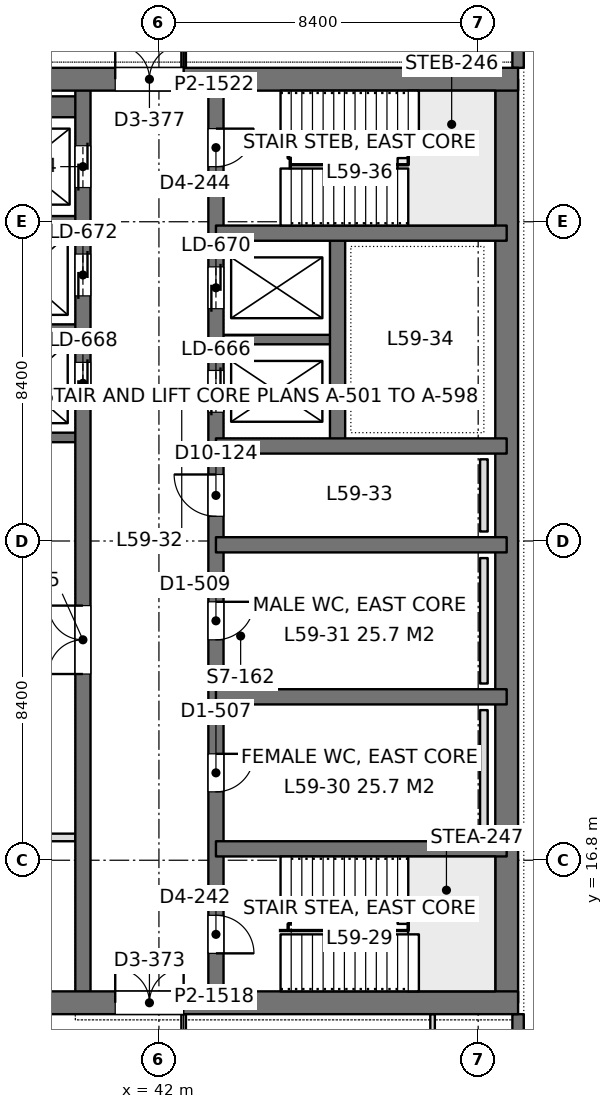
"""IFC4 building model, lengths in metres.
Left out: names, types, materials, properties, quantities, classifications, styles, units other than length and angle.
Written with IfcOpenShell. Run it as: python <this file> out.ifc"""

import sys

from ifc_helpers import new_model, si_unit, direction, frame, frame_2d, origin, place, context, subcontext, project, spatial, rectangle, extrude, element, fill, save


model = new_model("IFC4")
c1 = context("Model", 3, precision=1e-05, world=origin(), true_north=direction((0.0, 1.0)))
c2 = subcontext(c1, "Body", "Model", "MODEL_VIEW")
j1 = project(units=[si_unit("LENGTHUNIT", "METRE"), si_unit("PLANEANGLEUNIT", "RADIAN")], contexts=[c1])
p1 = place(None, origin())
s1 = spatial("IfcSite", under=j1, at=p1, CompositionType="ELEMENT")
p2 = place(p1, origin())
s2 = spatial("IfcBuilding", under=s1, at=p2, CompositionType="ELEMENT")
p3 = place(p2, frame((0.0, 0.0, 259.2)))
s3 = spatial("IfcBuildingStorey", under=s2, at=p3, CompositionType="ELEMENT", Elevation=259.2)
p4 = place(p3, frame((33.75, 13.05, 0.0), z_axis=(0.0, 0.0, 1.0), x_axis=(1.0, 0.0, 0.0)))
e1 = element("IfcWall", 1, at=p4, inside=s3, PredefinedType="SHEAR", context=c2, shape_type="SweptSolid", body=[
    extrude(rectangle(XDim=17.7, YDim=0.6, at=frame_2d((8.85, 0.0))), origin(), (0.0, 0.0, 1.0), 4.5),
])
p5 = place(p4, frame((7.1, 0.0, 0.0)))
e2 = element("IfcOpeningElement", 2, at=p5, cuts=e1, PredefinedType="OPENING", context=c2, shape_type="SweptSolid", body=[
    extrude(rectangle(XDim=1.8, YDim=2.4, at=frame_2d((0.9, 1.2))), frame((0.0, 0.31, 0.0), z_axis=(0.0, -1.0, 0.0), x_axis=(1.0, 0.0, 0.0)), (0.0, 0.0, 1.0), 0.62),
])
p6 = place(p3, frame((33.75, 37.35, 0.0), z_axis=(0.0, 0.0, 1.0), x_axis=(1.0, 0.0, 0.0)))
e3 = element("IfcWall", 3, at=p6, inside=s3, PredefinedType="SHEAR", context=c2, shape_type="SweptSolid", body=[
    extrude(rectangle(XDim=17.7, YDim=0.6, at=frame_2d((8.85, 0.0))), origin(), (0.0, 0.0, 1.0), 4.5),
])
p7 = place(p6, frame((7.1, 0.0, 0.0)))
e4 = element("IfcOpeningElement", 4, at=p7, cuts=e3, PredefinedType="OPENING", context=c2, shape_type="SweptSolid", body=[
    extrude(rectangle(XDim=1.8, YDim=2.4, at=frame_2d((0.9, 1.2))), frame((0.0, 0.31, 0.0), z_axis=(0.0, -1.0, 0.0), x_axis=(1.0, 0.0, 0.0)), (0.0, 0.0, 1.0), 0.62),
])
p8 = place(p3, frame((51.15, 13.05, 0.0), z_axis=(0.0, 0.0, 1.0), x_axis=(0.0, 1.0, 0.0)))
e5 = element("IfcWall", 5, at=p8, inside=s3, PredefinedType="SHEAR", context=c2, shape_type="SweptSolid", body=[
    extrude(rectangle(XDim=24.3, YDim=0.6, at=frame_2d((12.15, 0.0))), origin(), (0.0, 0.0, 1.0), 4.5),
])
p9 = place(p3, frame((43.5, 13.05, 0.0), z_axis=(0.0, 0.0, 1.0), x_axis=(0.0, 1.0, 0.0)))
e6 = element("IfcWall", 6, at=p9, inside=s3, PredefinedType="SHEAR", context=c2, shape_type="SweptSolid", body=[
    extrude(rectangle(XDim=24.3, YDim=0.4, at=frame_2d((12.15, 0.0))), origin(), (0.0, 0.0, 1.0), 4.5),
])
p10 = place(p9, frame((1.3, 0.0, 0.0)))
e7 = element("IfcOpeningElement", 7, at=p10, cuts=e6, PredefinedType="OPENING", context=c2, shape_type="SweptSolid", body=[
    extrude(rectangle(XDim=1.0, YDim=2.2, at=frame_2d((0.5, 1.1))), frame((0.0, 0.21, 0.0), z_axis=(0.0, -1.0, 0.0), x_axis=(1.0, 0.0, 0.0)), (0.0, 0.0, 1.0), 0.42),
])
p11 = place(p9, frame((22.0, 0.0, 0.0)))
e8 = element("IfcOpeningElement", 8, at=p11, cuts=e6, PredefinedType="OPENING", context=c2, shape_type="SweptSolid", body=[
    extrude(rectangle(XDim=1.0, YDim=2.2, at=frame_2d((0.5, 1.1))), frame((0.0, 0.21, 0.0), z_axis=(0.0, -1.0, 0.0), x_axis=(1.0, 0.0, 0.0)), (0.0, 0.0, 1.0), 0.42),
])
p12 = place(p9, frame((5.55, 0.0, 0.0)))
e9 = element("IfcOpeningElement", 9, at=p12, cuts=e6, PredefinedType="OPENING", context=c2, shape_type="SweptSolid", body=[
    extrude(rectangle(XDim=1.0, YDim=2.2, at=frame_2d((0.5, 1.1))), frame((0.0, 0.21, 0.0), z_axis=(0.0, -1.0, 0.0), x_axis=(1.0, 0.0, 0.0)), (0.0, 0.0, 1.0), 0.42),
])
p13 = place(p9, frame((9.55, 0.0, 0.0)))
e10 = element("IfcOpeningElement", 10, at=p13, cuts=e6, PredefinedType="OPENING", context=c2, shape_type="SweptSolid", body=[
    extrude(rectangle(XDim=1.0, YDim=2.2, at=frame_2d((0.5, 1.1))), frame((0.0, 0.21, 0.0), z_axis=(0.0, -1.0, 0.0), x_axis=(1.0, 0.0, 0.0)), (0.0, 0.0, 1.0), 0.42),
])
p14 = place(p9, frame((12.8, 0.0, 0.0)))
e11 = element("IfcOpeningElement", 11, at=p14, cuts=e6, PredefinedType="OPENING", context=c2, shape_type="SweptSolid", body=[
    extrude(rectangle(XDim=1.1, YDim=2.2, at=frame_2d((0.55, 1.1))), frame((0.0, 0.21, 0.0), z_axis=(0.0, -1.0, 0.0), x_axis=(1.0, 0.0, 0.0)), (0.0, 0.0, 1.0), 0.42),
])
p15 = place(p9, frame((15.538, 0.0, 0.0)))
e12 = element("IfcOpeningElement", 12, at=p15, cuts=e6, PredefinedType="OPENING", context=c2, shape_type="SweptSolid", body=[
    extrude(rectangle(XDim=1.1, YDim=2.2, at=frame_2d((0.55, 1.1))), frame((0.0, 0.21, 0.0), z_axis=(0.0, -1.0, 0.0), x_axis=(1.0, 0.0, 0.0)), (0.0, 0.0, 1.0), 0.42),
])
p16 = place(p9, frame((18.262, 0.0, 0.0)))
e13 = element("IfcOpeningElement", 13, at=p16, cuts=e6, PredefinedType="OPENING", context=c2, shape_type="SweptSolid", body=[
    extrude(rectangle(XDim=1.1, YDim=2.2, at=frame_2d((0.55, 1.1))), frame((0.0, 0.21, 0.0), z_axis=(0.0, -1.0, 0.0), x_axis=(1.0, 0.0, 0.0)), (0.0, 0.0, 1.0), 0.42),
])
p17 = place(p3, frame((40.0, 13.05, 0.0), z_axis=(0.0, 0.0, 1.0), x_axis=(0.0, 1.0, 0.0)))
e14 = element("IfcWall", 14, at=p17, inside=s3, PredefinedType="SHEAR", context=c2, shape_type="SweptSolid", body=[
    extrude(rectangle(XDim=24.3, YDim=0.4, at=frame_2d((12.15, 0.0))), origin(), (0.0, 0.0, 1.0), 4.5),
])
p18 = place(p17, frame((15.75, 0.0, 0.0)))
e15 = element("IfcOpeningElement", 15, at=p18, cuts=e14, PredefinedType="OPENING", context=c2, shape_type="SweptSolid", body=[
    extrude(rectangle(XDim=1.1, YDim=2.2, at=frame_2d((0.55, 1.1))), frame((0.0, 0.21, 0.0), z_axis=(0.0, -1.0, 0.0), x_axis=(1.0, 0.0, 0.0)), (0.0, 0.0, 1.0), 0.42),
])
p19 = place(p17, frame((18.6, 0.0, 0.0)))
e16 = element("IfcOpeningElement", 16, at=p19, cuts=e14, PredefinedType="OPENING", context=c2, shape_type="SweptSolid", body=[
    extrude(rectangle(XDim=1.1, YDim=2.2, at=frame_2d((0.55, 1.1))), frame((0.0, 0.21, 0.0), z_axis=(0.0, -1.0, 0.0), x_axis=(1.0, 0.0, 0.0)), (0.0, 0.0, 1.0), 0.42),
])
p20 = place(p17, frame((21.45, 0.0, 0.0)))
e17 = element("IfcOpeningElement", 17, at=p20, cuts=e14, PredefinedType="OPENING", context=c2, shape_type="SweptSolid", body=[
    extrude(rectangle(XDim=1.1, YDim=2.2, at=frame_2d((0.55, 1.1))), frame((0.0, 0.21, 0.0), z_axis=(0.0, -1.0, 0.0), x_axis=(1.0, 0.0, 0.0)), (0.0, 0.0, 1.0), 0.42),
])
p21 = place(p17, frame((8.65, 0.0, 0.0)))
e18 = element("IfcOpeningElement", 18, at=p21, cuts=e14, PredefinedType="OPENING", context=c2, shape_type="SweptSolid", body=[
    extrude(rectangle(XDim=1.8, YDim=2.4, at=frame_2d((0.9, 1.2))), frame((0.0, 0.21, 0.0), z_axis=(0.0, -1.0, 0.0), x_axis=(1.0, 0.0, 0.0)), (0.0, 0.0, 1.0), 0.42),
])
for number, where, z_axis, x_axis in (
    (19, (51.15, 17.1, 0.0), (0.0, 0.0, 1.0), (-1.0, 0.0, 0.0)),
    (20, (51.15, 21.1, 0.0), (0.0, 0.0, 1.0), (-1.0, 0.0, 0.0)),
    (21, (51.15, 25.1, 0.0), (0.0, 0.0, 1.0), (-1.0, 0.0, 0.0)),
    (22, (51.15, 27.7, 0.0), (0.0, 0.0, 1.0), (-1.0, 0.0, 0.0)),
    (23, (51.15, 33.3, 0.0), (0.0, 0.0, 1.0), (-1.0, 0.0, 0.0)),
):
    element("IfcWall", number, at=place(p3, frame(where, z_axis=z_axis, x_axis=x_axis)), inside=s3, PredefinedType="SHEAR", context=c2, shape_type="SweptSolid", body=[
        extrude(rectangle(XDim=7.65, YDim=0.4, at=frame_2d((3.825, 0.0))), origin(), (0.0, 0.0, 1.0), 4.5),
    ])
p22 = place(p3, frame((46.7, 27.7, 0.0), z_axis=(0.0, 0.0, 1.0), x_axis=(0.0, 1.0, 0.0)))
e24 = element("IfcWall", 24, at=p22, inside=s3, PredefinedType="SHEAR", context=c2, shape_type="SweptSolid", body=[
    extrude(rectangle(XDim=5.6, YDim=0.4, at=frame_2d((2.8, 0.0))), origin(), (0.0, 0.0, 1.0), 4.5),
])
p23 = place(p3, frame((46.7, 30.5, 0.0), z_axis=(0.0, 0.0, 1.0), x_axis=(-1.0, 0.0, 0.0)))
e25 = element("IfcWall", 25, at=p23, inside=s3, PredefinedType="SHEAR", context=c2, shape_type="SweptSolid", body=[
    extrude(rectangle(XDim=3.2, YDim=0.25, at=frame_2d((1.6, 0.0))), origin(), (0.0, 0.0, 1.0), 4.5),
])
p24 = place(p3, frame((40.0, 27.925, 0.0), z_axis=(0.0, 0.0, 1.0), x_axis=(-1.0, 0.0, 0.0)))
e26 = element("IfcWall", 26, at=p24, inside=s3, PredefinedType="SHEAR", context=c2, shape_type="SweptSolid", body=[
    extrude(rectangle(XDim=5.95, YDim=0.25, at=frame_2d((2.975, 0.0))), origin(), (0.0, 0.0, 1.0), 4.5),
])
for number, where, z_axis, x_axis in (
    (27, (40.0, 30.775, 0.0), (0.0, 0.0, 1.0), (-1.0, 0.0, 0.0)),
    (28, (40.0, 33.625, 0.0), (0.0, 0.0, 1.0), (-1.0, 0.0, 0.0)),
):
    element("IfcWall", number, at=place(p3, frame(where, z_axis=z_axis, x_axis=x_axis)), inside=s3, PredefinedType="SHEAR", context=c2, shape_type="SweptSolid", body=[
        extrude(rectangle(XDim=3.2, YDim=0.25, at=frame_2d((1.6, 0.0))), origin(), (0.0, 0.0, 1.0), 4.5),
    ])
p25 = place(p3, frame((40.0, 36.625, 0.0), z_axis=(0.0, 0.0, 1.0), x_axis=(-1.0, 0.0, 0.0)))
e29 = element("IfcWall", 29, at=p25, inside=s3, PredefinedType="SHEAR", context=c2, shape_type="SweptSolid", body=[
    extrude(rectangle(XDim=3.2, YDim=0.55, at=frame_2d((1.6, 0.0))), origin(), (0.0, 0.0, 1.0), 4.5),
])
p26 = place(p3, frame((51.45, 42.0, 0.0), z_axis=(0.0, 0.0, 1.0), x_axis=(0.0, -1.0, 0.0)))
e30 = element("IfcWall", 30, at=p26, inside=s3, PredefinedType="SOLIDWALL", context=c2, shape_type="SweptSolid", body=[
    extrude(rectangle(XDim=4.35, YDim=0.3, at=frame_2d((2.175, 0.0))), origin(), (0.0, 0.0, 1.0), 4.35),
])
p27 = place(p26, frame((0.975, 0.0, 0.9)))
e31 = element("IfcOpeningElement", 31, at=p27, cuts=e30, PredefinedType="OPENING", context=c2, shape_type="SweptSolid", body=[
    extrude(rectangle(XDim=2.4, YDim=1.9, at=frame_2d((1.2, 0.95))), frame((0.0, 0.16, 0.0), z_axis=(0.0, -1.0, 0.0), x_axis=(1.0, 0.0, 0.0)), (0.0, 0.0, 1.0), 0.32),
])
p28 = place(p3, frame((51.45, 12.75, 0.0), z_axis=(0.0, 0.0, 1.0), x_axis=(0.0, -1.0, 0.0)))
e32 = element("IfcWall", 32, at=p28, inside=s3, PredefinedType="SOLIDWALL", context=c2, shape_type="SweptSolid", body=[
    extrude(rectangle(XDim=4.35, YDim=0.3, at=frame_2d((2.175, 0.0))), origin(), (0.0, 0.0, 1.0), 4.35),
])
p29 = place(p28, frame((0.975, 0.0, 0.9)))
e33 = element("IfcOpeningElement", 33, at=p29, cuts=e32, PredefinedType="OPENING", context=c2, shape_type="SweptSolid", body=[
    extrude(rectangle(XDim=2.4, YDim=1.9, at=frame_2d((1.2, 0.95))), frame((0.0, 0.16, 0.0), z_axis=(0.0, -1.0, 0.0), x_axis=(1.0, 0.0, 0.0)), (0.0, 0.0, 1.0), 0.32),
])
p30 = place(p3, frame((33.898, 17.4, 0.0), z_axis=(0.0, 0.0, 1.0), x_axis=(1.0, 0.0, 0.0)))
e34 = element("IfcWall", 34, at=p30, inside=s3, PredefinedType="PARTITIONING", context=c2, shape_type="SweptSolid", body=[
    extrude(rectangle(XDim=5.904, YDim=0.2, at=frame_2d((2.952, 0.0))), origin(), (0.0, 0.0, 1.0), 3.8),
])
p31 = place(p3, frame((42.65, 10.898, 0.0), z_axis=(0.0, 0.0, 1.0), x_axis=(0.0, 1.0, 0.0)))
e35 = element("IfcWall", 35, at=p31, inside=s3, PredefinedType="PARTITIONING", context=c2, shape_type="SweptSolid", body=[
    extrude(rectangle(XDim=1.854, YDim=0.12, at=frame_2d((0.927, 0.0))), origin(), (0.0, 0.0, 1.0), 4.35),
])
p32 = place(p31, frame((0.252, 0.0, 0.0)))
e36 = element("IfcOpeningElement", 36, at=p32, cuts=e35, PredefinedType="OPENING", context=c2, shape_type="SweptSolid", body=[
    extrude(rectangle(XDim=1.1, YDim=2.4, at=frame_2d((0.55, 1.2))), frame((0.0, 0.07, 0.0), z_axis=(0.0, -1.0, 0.0), x_axis=(1.0, 0.0, 0.0)), (0.0, 0.0, 1.0), 0.14),
])
p33 = place(p3, frame((49.2, 10.8, 0.0), z_axis=(0.0, 0.0, 1.0), x_axis=(0.0, 1.0, 0.0)))
e37 = element("IfcWall", 37, at=p33, inside=s3, PredefinedType="PARTITIONING", context=c2, shape_type="SweptSolid", body=[
    extrude(rectangle(XDim=1.952, YDim=0.12, at=frame_2d((0.976, 0.0))), origin(), (0.0, 0.0, 1.0), 4.35),
])
p34 = place(p3, frame((42.65, 37.648, 0.0), z_axis=(0.0, 0.0, 1.0), x_axis=(0.0, 1.0, 0.0)))
e38 = element("IfcWall", 38, at=p34, inside=s3, PredefinedType="PARTITIONING", context=c2, shape_type="SweptSolid", body=[
    extrude(rectangle(XDim=1.854, YDim=0.12, at=frame_2d((0.927, 0.0))), origin(), (0.0, 0.0, 1.0), 4.35),
])
p35 = place(p34, frame((0.502, 0.0, 0.0)))
e39 = element("IfcOpeningElement", 39, at=p35, cuts=e38, PredefinedType="OPENING", context=c2, shape_type="SweptSolid", body=[
    extrude(rectangle(XDim=1.1, YDim=2.4, at=frame_2d((0.55, 1.2))), frame((0.0, 0.07, 0.0), z_axis=(0.0, -1.0, 0.0), x_axis=(1.0, 0.0, 0.0)), (0.0, 0.0, 1.0), 0.14),
])
p36 = place(p3, frame((49.2, 37.648, 0.0), z_axis=(0.0, 0.0, 1.0), x_axis=(0.0, 1.0, 0.0)))
e40 = element("IfcWall", 40, at=p36, inside=s3, PredefinedType="PARTITIONING", context=c2, shape_type="SweptSolid", body=[
    extrude(rectangle(XDim=1.952, YDim=0.12, at=frame_2d((0.976, 0.0))), origin(), (0.0, 0.0, 1.0), 4.35),
])
for number, where, z_axis, x_axis in (
    (41, (50.55, 17.45, 0.0), (0.0, 0.0, 1.0), (0.0, 1.0, 0.0)),
    (42, (50.55, 21.45, 0.0), (0.0, 0.0, 1.0), (0.0, 1.0, 0.0)),
):
    element("IfcWall", number, at=place(p3, frame(where, z_axis=z_axis, x_axis=x_axis)), inside=s3, PredefinedType="PLUMBINGWALL", context=c2, shape_type="SweptSolid", body=[
        extrude(rectangle(XDim=3.3, YDim=0.2, at=frame_2d((1.65, 0.0))), origin(), (0.0, 0.0, 1.0), 1.2),
    ])
p37 = place(p3, frame((50.55, 25.45, 0.0), z_axis=(0.0, 0.0, 1.0), x_axis=(0.0, 1.0, 0.0)))
e43 = element("IfcWall", 43, at=p37, inside=s3, PredefinedType="PLUMBINGWALL", context=c2, shape_type="SweptSolid", body=[
    extrude(rectangle(XDim=1.9, YDim=0.2, at=frame_2d((0.95, 0.0))), origin(), (0.0, 0.0, 1.0), 1.2),
])
p38 = place(p5, origin())
e44 = element("IfcDoor", 44, at=p38, inside=s3, OperationType="DOUBLE_DOOR_SINGLE_SWING", PredefinedType="DOOR", context=c2, shape_type="SweptSolid", body=[
    extrude(rectangle(XDim=1.8, YDim=2.4, at=frame_2d((0.9, 1.2))), frame((0.0, 0.025, 0.0), z_axis=(0.0, -1.0, 0.0), x_axis=(1.0, 0.0, 0.0)), (0.0, 0.0, 1.0), 0.05),
])
fill(e2, e44)
p39 = place(p7, origin())
e45 = element("IfcDoor", 45, at=p39, inside=s3, OperationType="DOUBLE_DOOR_SINGLE_SWING", PredefinedType="DOOR", context=c2, shape_type="SweptSolid", body=[
    extrude(rectangle(XDim=1.8, YDim=2.4, at=frame_2d((0.9, 1.2))), frame((0.0, 0.025, 0.0), z_axis=(0.0, -1.0, 0.0), x_axis=(1.0, 0.0, 0.0)), (0.0, 0.0, 1.0), 0.05),
])
fill(e4, e45)
p40 = place(p10, frame((1.0, 0.0, 0.0), z_axis=(0.0, 0.0, 1.0), x_axis=(-1.0, 0.0, 0.0)))
e46 = element("IfcDoor", 46, at=p40, inside=s3, OperationType="SINGLE_SWING_RIGHT", PredefinedType="DOOR", context=c2, shape_type="SweptSolid", body=[
    extrude(rectangle(XDim=1.0, YDim=2.2, at=frame_2d((0.5, 1.1))), frame((0.0, 0.025, 0.0), z_axis=(0.0, -1.0, 0.0), x_axis=(1.0, 0.0, 0.0)), (0.0, 0.0, 1.0), 0.05),
])
fill(e7, e46)
p41 = place(p11, frame((1.0, 0.0, 0.0), z_axis=(0.0, 0.0, 1.0), x_axis=(-1.0, 0.0, 0.0)))
e47 = element("IfcDoor", 47, at=p41, inside=s3, OperationType="SINGLE_SWING_LEFT", PredefinedType="DOOR", context=c2, shape_type="SweptSolid", body=[
    extrude(rectangle(XDim=1.0, YDim=2.2, at=frame_2d((0.5, 1.1))), frame((0.0, 0.025, 0.0), z_axis=(0.0, -1.0, 0.0), x_axis=(1.0, 0.0, 0.0)), (0.0, 0.0, 1.0), 0.05),
])
fill(e8, e47)
p42 = place(p12, frame((1.0, 0.0, 0.0), z_axis=(0.0, 0.0, 1.0), x_axis=(-1.0, 0.0, 0.0)))
e48 = element("IfcDoor", 48, at=p42, inside=s3, OperationType="SINGLE_SWING_LEFT", PredefinedType="DOOR", context=c2, shape_type="SweptSolid", body=[
    extrude(rectangle(XDim=1.0, YDim=2.2, at=frame_2d((0.5, 1.1))), frame((0.0, 0.025, 0.0), z_axis=(0.0, -1.0, 0.0), x_axis=(1.0, 0.0, 0.0)), (0.0, 0.0, 1.0), 0.05),
])
fill(e9, e48)
p43 = place(p13, frame((1.0, 0.0, 0.0), z_axis=(0.0, 0.0, 1.0), x_axis=(-1.0, 0.0, 0.0)))
e49 = element("IfcDoor", 49, at=p43, inside=s3, OperationType="SINGLE_SWING_LEFT", PredefinedType="DOOR", context=c2, shape_type="SweptSolid", body=[
    extrude(rectangle(XDim=1.0, YDim=2.2, at=frame_2d((0.5, 1.1))), frame((0.0, 0.025, 0.0), z_axis=(0.0, -1.0, 0.0), x_axis=(1.0, 0.0, 0.0)), (0.0, 0.0, 1.0), 0.05),
])
fill(e10, e49)
p44 = place(p14, origin())
e50 = element("IfcDoor", 50, at=p44, inside=s3, OperationType="SINGLE_SWING_RIGHT", PredefinedType="DOOR", context=c2, shape_type="SweptSolid", body=[
    extrude(rectangle(XDim=1.1, YDim=2.2, at=frame_2d((0.55, 1.1))), frame((0.0, 0.025, 0.0), z_axis=(0.0, -1.0, 0.0), x_axis=(1.0, 0.0, 0.0)), (0.0, 0.0, 1.0), 0.05),
])
fill(e11, e50)
p45 = place(p18, origin())
e51 = element("IfcDoor", 51, at=p45, inside=s3, OperationType="DOUBLE_DOOR_SLIDING", PredefinedType="DOOR", context=c2, shape_type="SweptSolid", body=[
    extrude(rectangle(XDim=1.1, YDim=2.2, at=frame_2d((0.55, 1.1))), frame((0.0, 0.025, 0.0), z_axis=(0.0, -1.0, 0.0), x_axis=(1.0, 0.0, 0.0)), (0.0, 0.0, 1.0), 0.05),
])
fill(e15, e51)
p46 = place(p19, origin())
e52 = element("IfcDoor", 52, at=p46, inside=s3, OperationType="DOUBLE_DOOR_SLIDING", PredefinedType="DOOR", context=c2, shape_type="SweptSolid", body=[
    extrude(rectangle(XDim=1.1, YDim=2.2, at=frame_2d((0.55, 1.1))), frame((0.0, 0.025, 0.0), z_axis=(0.0, -1.0, 0.0), x_axis=(1.0, 0.0, 0.0)), (0.0, 0.0, 1.0), 0.05),
])
fill(e16, e52)
p47 = place(p20, origin())
e53 = element("IfcDoor", 53, at=p47, inside=s3, OperationType="DOUBLE_DOOR_SLIDING", PredefinedType="DOOR", context=c2, shape_type="SweptSolid", body=[
    extrude(rectangle(XDim=1.1, YDim=2.2, at=frame_2d((0.55, 1.1))), frame((0.0, 0.025, 0.0), z_axis=(0.0, -1.0, 0.0), x_axis=(1.0, 0.0, 0.0)), (0.0, 0.0, 1.0), 0.05),
])
fill(e17, e53)
p48 = place(p15, origin())
e54 = element("IfcDoor", 54, at=p48, inside=s3, OperationType="DOUBLE_DOOR_SLIDING", PredefinedType="DOOR", context=c2, shape_type="SweptSolid", body=[
    extrude(rectangle(XDim=1.1, YDim=2.2, at=frame_2d((0.55, 1.1))), frame((0.0, 0.025, 0.0), z_axis=(0.0, -1.0, 0.0), x_axis=(1.0, 0.0, 0.0)), (0.0, 0.0, 1.0), 0.05),
])
fill(e12, e54)
p49 = place(p16, origin())
e55 = element("IfcDoor", 55, at=p49, inside=s3, OperationType="DOUBLE_DOOR_SLIDING", PredefinedType="DOOR", context=c2, shape_type="SweptSolid", body=[
    extrude(rectangle(XDim=1.1, YDim=2.2, at=frame_2d((0.55, 1.1))), frame((0.0, 0.025, 0.0), z_axis=(0.0, -1.0, 0.0), x_axis=(1.0, 0.0, 0.0)), (0.0, 0.0, 1.0), 0.05),
])
fill(e13, e55)
p50 = place(p21, origin())
e56 = element("IfcDoor", 56, at=p50, inside=s3, OperationType="DOUBLE_DOOR_SINGLE_SWING", PredefinedType="DOOR", context=c2, shape_type="SweptSolid", body=[
    extrude(rectangle(XDim=1.8, YDim=2.4, at=frame_2d((0.9, 1.2))), frame((0.0, 0.025, 0.0), z_axis=(0.0, -1.0, 0.0), x_axis=(1.0, 0.0, 0.0)), (0.0, 0.0, 1.0), 0.05),
])
fill(e18, e56)
save(model, sys.argv[1])
